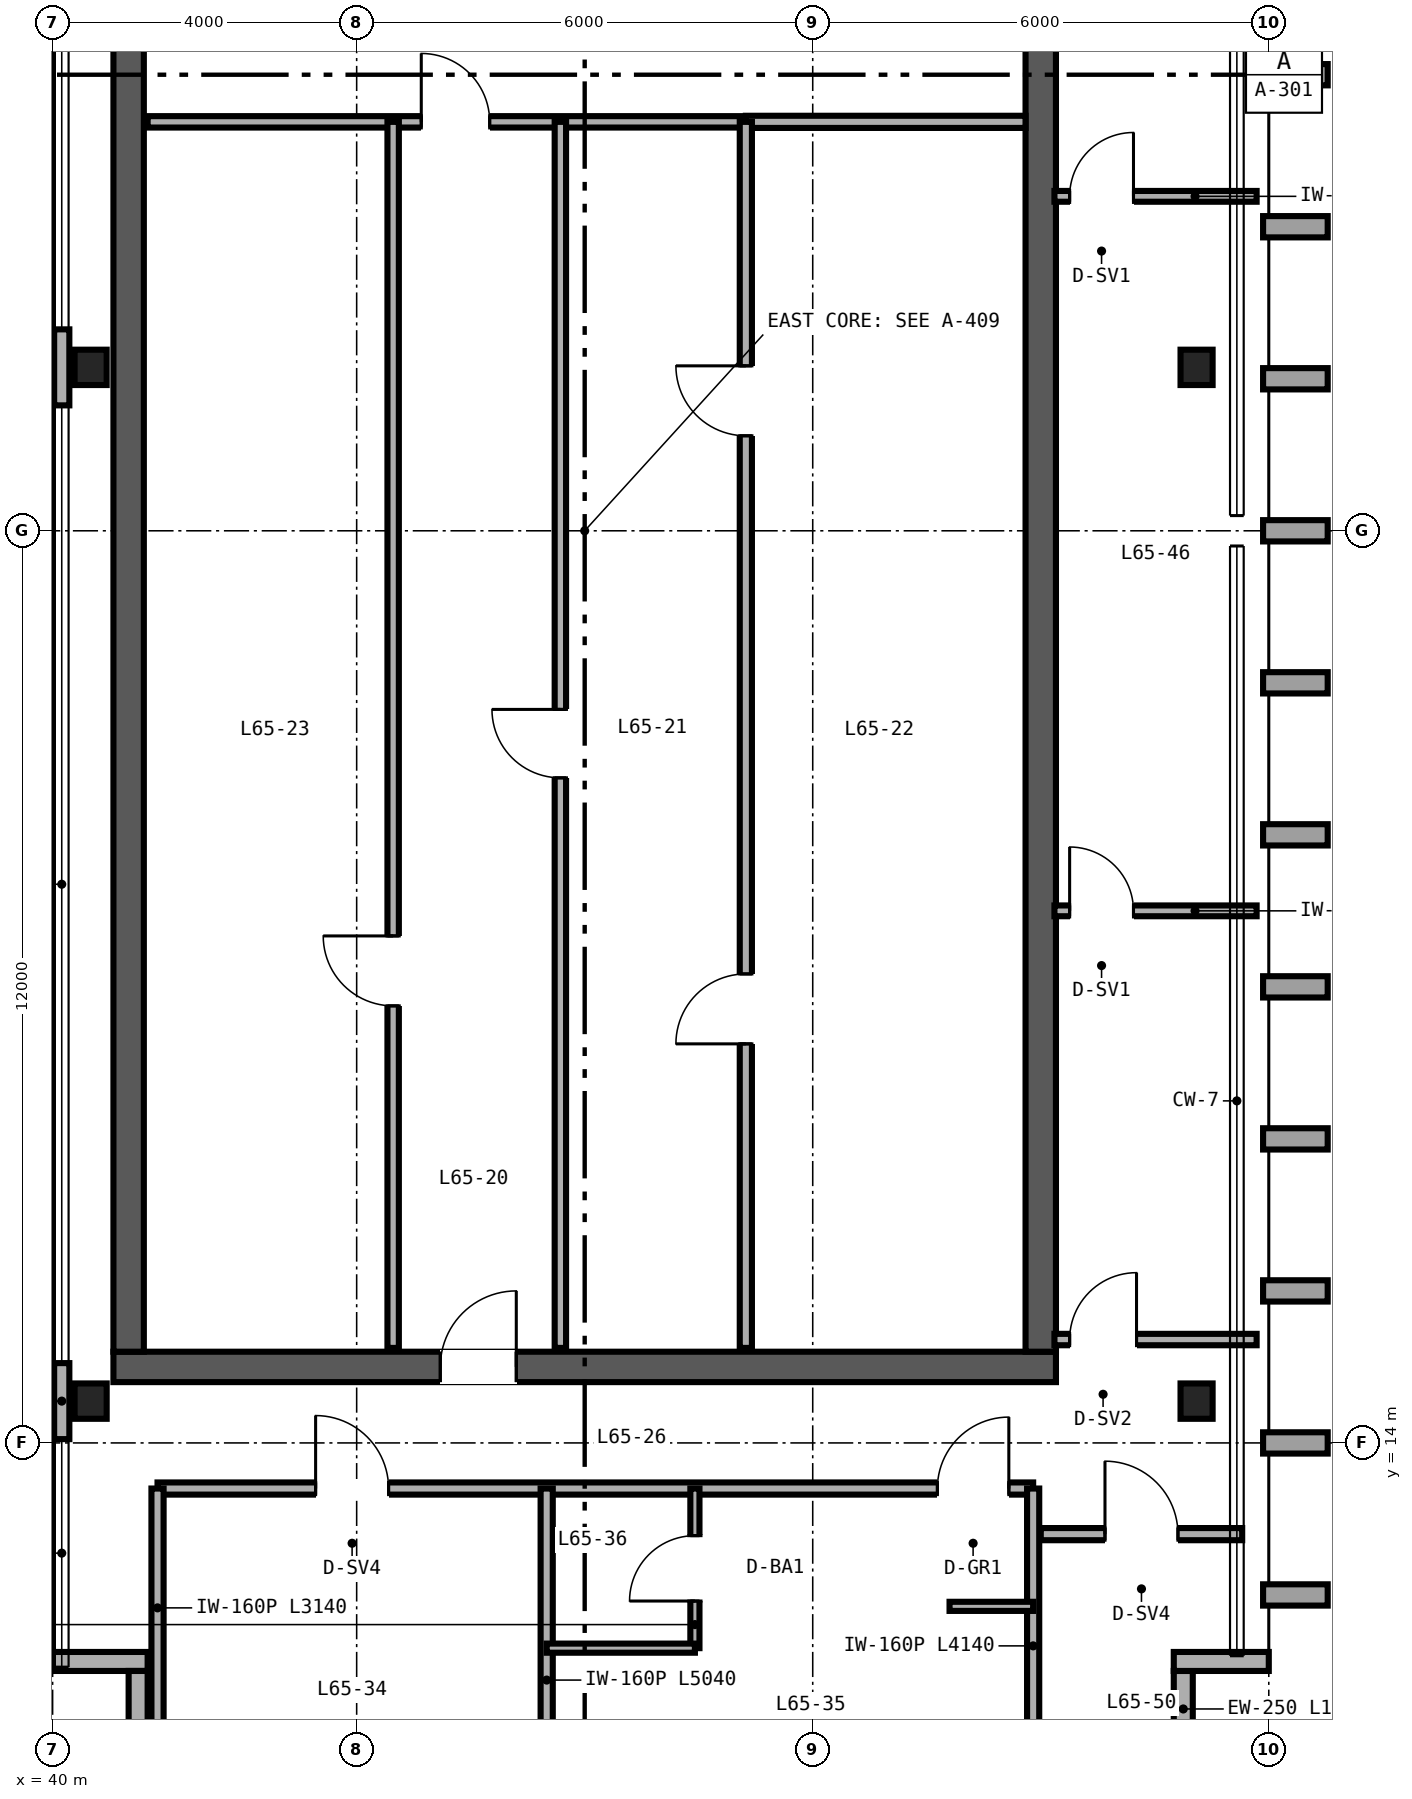
"""IFC4 building model, lengths in metres.
Left out: names, types, materials, properties, quantities, classifications, styles, units other than length and angle.
Written with IfcOpenShell. Run it as: python <this file> out.ifc"""

import sys

from ifc_helpers import new_model, si_unit, direction, frame, frame_2d, origin, origin_2d, place, context, subcontext, project, spatial, rectangle, i_section, extrude, source, transform, mapped, element, fill, save


model = new_model("IFC4")
c1 = context("Model", 3, precision=1e-05, world=origin(), true_north=direction((0.0, 1.0)))
c2 = subcontext(c1, "Body", "Model", "MODEL_VIEW")
j1 = project(units=[si_unit("LENGTHUNIT", "METRE"), si_unit("PLANEANGLEUNIT", "RADIAN")], contexts=[c1])
p1 = place(None, origin())
s1 = spatial("IfcSite", under=j1, at=p1, CompositionType="ELEMENT")
p2 = place(p1, origin())
s2 = spatial("IfcBuilding", under=s1, at=p2, CompositionType="ELEMENT")
p3 = place(p2, frame((0.0, 0.0, 258.0)))
s3 = spatial("IfcBuildingStorey", under=s2, at=p3, CompositionType="ELEMENT", Elevation=258.0)
p4 = place(p3, frame((40.8, 15.0, 0.0), z_axis=(0.0, 0.0, 1.0), x_axis=(1.0, 0.0, 0.0)))
e1 = element("IfcWall", 1, at=p4, inside=s3, PredefinedType="SHEAR", context=c2, shape_type="SweptSolid", body=[
    extrude(rectangle(XDim=12.4, YDim=0.4, at=frame_2d((6.2, 0.0))), origin(), (0.0, 0.0, 1.0), 3.38),
])
p5 = place(p4, frame((4.3, 0.0, 0.0)))
e2 = element("IfcOpeningElement", 2, at=p5, cuts=e1, PredefinedType="OPENING", context=c2, shape_type="SweptSolid", body=[
    extrude(rectangle(XDim=1.0, YDim=2.15, at=frame_2d((0.5, 1.075))), frame((0.0, 0.21, 0.0), z_axis=(0.0, -1.0, 0.0), x_axis=(1.0, 0.0, 0.0)), (0.0, 0.0, 1.0), 0.42),
])
for number, where, z_axis, x_axis in (
    (3, (41.0, 15.2, 0.0), (0.0, 0.0, 1.0), (0.0, 1.0, 0.0)),
    (4, (53.0, 15.2, 0.0), (0.0, 0.0, 1.0), (0.0, 1.0, 0.0)),
):
    element("IfcWall", number, at=place(p3, frame(where, z_axis=z_axis, x_axis=x_axis)), inside=s3, PredefinedType="SHEAR", context=c2, shape_type="SweptSolid", body=[
        extrude(rectangle(XDim=21.6, YDim=0.4, at=frame_2d((10.8, 0.0))), origin(), (0.0, 0.0, 1.0), 3.38),
    ])
m1 = source(origin(), c2, "Body", "SweptSolid", [
    extrude(i_section(OverallWidth=0.422, OverallDepth=0.465, WebThickness=0.045, FlangeThickness=0.073, FilletRadius=0.025, at=origin_2d()), origin(), (0.0, 0.0, 1.0), 3.38),
])
for number, where, z_axis, x_axis in (
    (5, (40.5, 14.55, 0.0), (0.0, 0.0, 1.0), (1.0, 0.0, 0.0)),
    (6, (55.05, 14.55, 0.0), (0.0, 0.0, 1.0), (1.0, 0.0, 0.0)),
    (7, (40.5, 28.15, 0.0), (0.0, 0.0, 1.0), (1.0, 0.0, 0.0)),
    (8, (55.05, 28.15, 0.0), (0.0, 0.0, 1.0), (1.0, 0.0, 0.0)),
):
    element("IfcColumn", number, at=place(p3, frame(where, z_axis=z_axis, x_axis=x_axis)), inside=s3, PredefinedType="COLUMN", context=c2, shape_type="MappedRepresentation", body=[
        mapped(m1, transform((0.0, 0.0, 0.0), scale=1.0)),
    ])
p6 = place(p3, frame((54.875, 10.0, 0.0), z_axis=(0.0, 0.0, 1.0), x_axis=(0.0, 1.0, 0.0)))
e9 = element("IfcWall", 9, at=p6, inside=s3, PredefinedType="SOLIDWALL", context=c2, shape_type="SweptSolid", body=[
    extrude(rectangle(XDim=1.0, YDim=0.25, at=frame_2d((0.5, 0.0))), origin(), (0.0, 0.0, 1.0), 3.38),
])
for number, where, z_axis, x_axis in (
    (10, (54.75, 11.125, 0.0), (0.0, 0.0, 1.0), (1.0, 0.0, 0.0)),
    (11, (40.0, 11.125, 0.0), (0.0, 0.0, 1.0), (1.0, 0.0, 0.0)),
):
    element("IfcWall", number, at=place(p3, frame(where, z_axis=z_axis, x_axis=x_axis)), inside=s3, PredefinedType="SOLIDWALL", context=c2, shape_type="SweptSolid", body=[
        extrude(rectangle(XDim=1.25, YDim=0.25, at=frame_2d((0.625, 0.0))), origin(), (0.0, 0.0, 1.0), 3.38),
    ])
p7 = place(p3, frame((41.125, 11.0, 0.0), z_axis=(0.0, 0.0, 1.0), x_axis=(0.0, -1.0, 0.0)))
e12 = element("IfcWall", 12, at=p7, inside=s3, PredefinedType="SOLIDWALL", context=c2, shape_type="SweptSolid", body=[
    extrude(rectangle(XDim=1.0, YDim=0.25, at=frame_2d((0.5, 0.0))), origin(), (0.0, 0.0, 1.0), 3.38),
])
for number, where, z_axis, x_axis in (
    (13, (40.12, 14.05, 0.0), (0.0, 0.0, 1.0), (0.0, 1.0, 0.0)),
    (14, (40.12, 27.65, 0.0), (0.0, 0.0, 1.0), (0.0, 1.0, 0.0)),
):
    element("IfcWall", number, at=place(p3, frame(where, z_axis=z_axis, x_axis=x_axis)), inside=s3, PredefinedType="PARAPET", context=c2, shape_type="SweptSolid", body=[
        extrude(rectangle(XDim=1.0, YDim=0.2, at=frame_2d((0.5, 0.0))), origin(), (0.0, 0.0, 1.0), 3.38),
    ])
p8 = place(p3, frame((41.25, 31.38, 0.0), z_axis=(0.0, 0.0, 1.0), x_axis=(1.0, 0.0, 0.0)))
e15 = element("IfcWall", 15, at=p8, inside=s3, PredefinedType="PARTITIONING", context=c2, shape_type="SweptSolid", body=[
    extrude(rectangle(XDim=7.87, YDim=0.15, at=frame_2d((3.935, 0.0))), origin(), (0.0, 0.0, 1.0), 2.48),
])
p9 = place(p8, frame((3.6, 0.0, 0.0)))
e16 = element("IfcOpeningElement", 16, at=p9, cuts=e15, PredefinedType="OPENING", context=c2, shape_type="SweptSolid", body=[
    extrude(rectangle(XDim=0.9, YDim=2.15, at=frame_2d((0.45, 1.075))), frame((0.0, 0.085, 0.0), z_axis=(0.0, -1.0, 0.0), x_axis=(1.0, 0.0, 0.0)), (0.0, 0.0, 1.0), 0.17),
])
p10 = place(p3, frame((46.68, 15.25, 0.0), z_axis=(0.0, 0.0, 1.0), x_axis=(0.0, 1.0, 0.0)))
e17 = element("IfcWall", 17, at=p10, inside=s3, PredefinedType="PARTITIONING", context=c2, shape_type="SweptSolid", body=[
    extrude(rectangle(XDim=16.13, YDim=0.15, at=frame_2d((8.065, 0.0))), origin(), (0.0, 0.0, 1.0), 2.453),
])
p11 = place(p10, frame((7.5, 0.0, 0.0)))
e18 = element("IfcOpeningElement", 18, at=p11, cuts=e17, PredefinedType="OPENING", context=c2, shape_type="SweptSolid", body=[
    extrude(rectangle(XDim=0.9, YDim=2.15, at=frame_2d((0.45, 1.075))), frame((0.0, 0.085, 0.0), z_axis=(0.0, -1.0, 0.0), x_axis=(1.0, 0.0, 0.0)), (0.0, 0.0, 1.0), 0.17),
])
p12 = place(p3, frame((49.12, 31.38, 0.0), z_axis=(0.0, 0.0, 1.0), x_axis=(1.0, 0.0, 0.0)))
e19 = element("IfcWall", 19, at=p12, inside=s3, PredefinedType="PARTITIONING", context=c2, shape_type="SweptSolid", body=[
    extrude(rectangle(XDim=3.68, YDim=0.16, at=frame_2d((1.84, 0.0))), origin(), (0.0, 0.0, 1.0), 2.48),
])
p13 = place(p3, frame((49.12, 15.25, 0.0), z_axis=(0.0, 0.0, 1.0), x_axis=(0.0, 1.0, 0.0)))
e20 = element("IfcWall", 20, at=p13, inside=s3, PredefinedType="PARTITIONING", context=c2, shape_type="SweptSolid", body=[
    extrude(rectangle(XDim=16.13, YDim=0.16, at=frame_2d((8.065, 0.0))), origin(), (0.0, 0.0, 1.0), 2.453),
])
p14 = place(p13, frame((4.0, 0.0, 0.0)))
e21 = element("IfcOpeningElement", 21, at=p14, cuts=e20, PredefinedType="OPENING", context=c2, shape_type="SweptSolid", body=[
    extrude(rectangle(XDim=0.92, YDim=2.15, at=frame_2d((0.46, 1.075))), frame((0.0, 0.09, 0.0), z_axis=(0.0, -1.0, 0.0), x_axis=(1.0, 0.0, 0.0)), (0.0, 0.0, 1.0), 0.18),
])
p15 = place(p13, frame((12.0, 0.0, 0.0)))
e22 = element("IfcOpeningElement", 22, at=p15, cuts=e20, PredefinedType="OPENING", context=c2, shape_type="SweptSolid", body=[
    extrude(rectangle(XDim=0.92, YDim=2.15, at=frame_2d((0.46, 1.075))), frame((0.0, 0.09, 0.0), z_axis=(0.0, -1.0, 0.0), x_axis=(1.0, 0.0, 0.0)), (0.0, 0.0, 1.0), 0.18),
])
p16 = place(p3, frame((44.48, 15.25, 0.0), z_axis=(0.0, 0.0, 1.0), x_axis=(0.0, 1.0, 0.0)))
e23 = element("IfcWall", 23, at=p16, inside=s3, PredefinedType="PARTITIONING", context=c2, shape_type="SweptSolid", body=[
    extrude(rectangle(XDim=16.13, YDim=0.15, at=frame_2d((8.065, 0.0))), origin(), (0.0, 0.0, 1.0), 2.453),
])
p17 = place(p16, frame((4.5, 0.0, 0.0)))
e24 = element("IfcOpeningElement", 24, at=p17, cuts=e23, PredefinedType="OPENING", context=c2, shape_type="SweptSolid", body=[
    extrude(rectangle(XDim=0.92, YDim=2.15, at=frame_2d((0.46, 1.075))), frame((0.0, 0.085, 0.0), z_axis=(0.0, -1.0, 0.0), x_axis=(1.0, 0.0, 0.0)), (0.0, 0.0, 1.0), 0.17),
])
p18 = place(p3, frame((41.38, 13.4, 0.0), z_axis=(0.0, 0.0, 1.0), x_axis=(1.0, 0.0, 0.0)))
e25 = element("IfcWall", 25, at=p18, inside=s3, PredefinedType="PARTITIONING", context=c2, shape_type="SweptSolid", body=[
    extrude(rectangle(XDim=11.52, YDim=0.16, at=frame_2d((5.76, 0.0))), origin(), (0.0, 0.0, 1.0), 3.38),
])
p19 = place(p18, frame((2.08, 0.0, 0.0)))
e26 = element("IfcOpeningElement", 26, at=p19, cuts=e25, PredefinedType="OPENING", context=c2, shape_type="SweptSolid", body=[
    extrude(rectangle(XDim=0.96, YDim=2.15, at=frame_2d((0.48, 1.075))), frame((0.0, 0.09, 0.0), z_axis=(0.0, -1.0, 0.0), x_axis=(1.0, 0.0, 0.0)), (0.0, 0.0, 1.0), 0.18),
])
p20 = place(p18, frame((10.26, 0.0, 0.0)))
e27 = element("IfcOpeningElement", 27, at=p20, cuts=e25, PredefinedType="OPENING", context=c2, shape_type="SweptSolid", body=[
    extrude(rectangle(XDim=0.94, YDim=2.15, at=frame_2d((0.47, 1.075))), frame((0.0, 0.09, 0.0), z_axis=(0.0, -1.0, 0.0), x_axis=(1.0, 0.0, 0.0)), (0.0, 0.0, 1.0), 0.18),
])
p21 = place(p3, frame((41.38, 10.26, 0.0), z_axis=(0.0, 0.0, 1.0), x_axis=(0.0, 1.0, 0.0)))
e28 = element("IfcWall", 28, at=p21, inside=s3, PredefinedType="PARTITIONING", context=c2, shape_type="SweptSolid", body=[
    extrude(rectangle(XDim=3.14, YDim=0.16, at=frame_2d((1.57, 0.0))), origin(), (0.0, 0.0, 1.0), 3.38),
])
p22 = place(p3, frame((52.9, 9.26, 0.0), z_axis=(0.0, 0.0, 1.0), x_axis=(0.0, 1.0, 0.0)))
e29 = element("IfcWall", 29, at=p22, inside=s3, PredefinedType="PARTITIONING", context=c2, shape_type="SweptSolid", body=[
    extrude(rectangle(XDim=4.14, YDim=0.16, at=frame_2d((2.07, 0.0))), origin(), (0.0, 0.0, 1.0), 3.38),
])
p23 = place(p3, frame((46.5, 8.36, 0.0), z_axis=(0.0, 0.0, 1.0), x_axis=(0.0, 1.0, 0.0)))
e30 = element("IfcWall", 30, at=p23, inside=s3, PredefinedType="PARTITIONING", context=c2, shape_type="SweptSolid", body=[
    extrude(rectangle(XDim=5.04, YDim=0.16, at=frame_2d((2.52, 0.0))), origin(), (0.0, 0.0, 1.0), 2.687),
])
p24 = place(p3, frame((48.45, 11.3, 0.0), z_axis=(0.0, 0.0, 1.0), x_axis=(0.0, 1.0, 0.0)))
e31 = element("IfcWall", 31, at=p24, inside=s3, PredefinedType="PARTITIONING", context=c2, shape_type="SweptSolid", body=[
    extrude(rectangle(XDim=2.1, YDim=0.12, at=frame_2d((1.05, 0.0))), origin(), (0.0, 0.0, 1.0), 3.38),
])
p25 = place(p24, frame((0.62, 0.0, 0.0)))
e32 = element("IfcOpeningElement", 32, at=p25, cuts=e31, PredefinedType="OPENING", context=c2, shape_type="SweptSolid", body=[
    extrude(rectangle(XDim=0.86, YDim=2.1, at=frame_2d((0.43, 1.05))), frame((0.0, 0.07, 0.0), z_axis=(0.0, -1.0, 0.0), x_axis=(1.0, 0.0, 0.0)), (0.0, 0.0, 1.0), 0.14),
])
p26 = place(p3, frame((46.5, 11.3, 0.0), z_axis=(0.0, 0.0, 1.0), x_axis=(1.0, 0.0, 0.0)))
e33 = element("IfcWall", 33, at=p26, inside=s3, PredefinedType="PARTITIONING", context=c2, shape_type="SweptSolid", body=[
    extrude(rectangle(XDim=1.95, YDim=0.12, at=frame_2d((0.975, 0.0))), origin(), (0.0, 0.0, 1.0), 3.38),
])
p27 = place(p3, frame((51.8, 11.85, 0.0), z_axis=(0.0, 0.0, 1.0), x_axis=(1.0, 0.0, 0.0)))
e34 = element("IfcWall", 34, at=p27, inside=s3, PredefinedType="PARTITIONING", context=c2, shape_type="SweptSolid", body=[
    extrude(rectangle(XDim=1.1, YDim=0.12, at=frame_2d((0.55, 0.0))), origin(), (0.0, 0.0, 1.0), 3.38),
])
p28 = place(p3, frame((53.18, 15.36, 0.0), z_axis=(0.0, 0.0, 1.0), x_axis=(1.0, 0.0, 0.0)))
e35 = element("IfcWall", 35, at=p28, inside=s3, PredefinedType="PARTITIONING", context=c2, shape_type="SweptSolid", body=[
    extrude(rectangle(XDim=2.66, YDim=0.15, at=frame_2d((1.33, 0.0))), origin(), (0.0, 0.0, 1.0), 2.601),
])
p29 = place(p28, frame((0.2, 0.0, 0.0)))
e36 = element("IfcOpeningElement", 36, at=p29, cuts=e35, PredefinedType="OPENING", context=c2, shape_type="SweptSolid", body=[
    extrude(rectangle(XDim=0.88, YDim=2.15, at=frame_2d((0.44, 1.075))), frame((0.0, 0.085, 0.0), z_axis=(0.0, -1.0, 0.0), x_axis=(1.0, 0.0, 0.0)), (0.0, 0.0, 1.0), 0.17),
])
p30 = place(p3, frame((53.18, 21.0, 0.0), z_axis=(0.0, 0.0, 1.0), x_axis=(1.0, 0.0, 0.0)))
e37 = element("IfcWall", 37, at=p30, inside=s3, PredefinedType="PARTITIONING", context=c2, shape_type="SweptSolid", body=[
    extrude(rectangle(XDim=2.66, YDim=0.142, at=frame_2d((1.33, 0.0))), origin(), (0.0, 0.0, 1.0), 2.601),
])
p31 = place(p30, frame((0.2, 0.0, 0.0)))
e38 = element("IfcOpeningElement", 38, at=p31, cuts=e37, PredefinedType="OPENING", context=c2, shape_type="SweptSolid", body=[
    extrude(rectangle(XDim=0.84, YDim=2.1, at=frame_2d((0.42, 1.05))), frame((0.0, 0.081, 0.0), z_axis=(0.0, -1.0, 0.0), x_axis=(1.0, 0.0, 0.0)), (0.0, 0.0, 1.0), 0.162),
])
p32 = place(p3, frame((53.18, 30.4, 0.0), z_axis=(0.0, 0.0, 1.0), x_axis=(1.0, 0.0, 0.0)))
e39 = element("IfcWall", 39, at=p32, inside=s3, PredefinedType="PARTITIONING", context=c2, shape_type="SweptSolid", body=[
    extrude(rectangle(XDim=2.66, YDim=0.142, at=frame_2d((1.33, 0.0))), origin(), (0.0, 0.0, 1.0), 2.763),
])
p33 = place(p32, frame((0.2, 0.0, 0.0)))
e40 = element("IfcOpeningElement", 40, at=p33, cuts=e39, PredefinedType="OPENING", context=c2, shape_type="SweptSolid", body=[
    extrude(rectangle(XDim=0.84, YDim=2.1, at=frame_2d((0.42, 1.05))), frame((0.0, 0.081, 0.0), z_axis=(0.0, -1.0, 0.0), x_axis=(1.0, 0.0, 0.0)), (0.0, 0.0, 1.0), 0.162),
])
p34 = place(p3, frame((53.0, 12.8, 0.0), z_axis=(0.0, 0.0, 1.0), x_axis=(1.0, 0.0, 0.0)))
e41 = element("IfcWall", 41, at=p34, inside=s3, PredefinedType="PARTITIONING", context=c2, shape_type="SweptSolid", body=[
    extrude(rectangle(XDim=2.65, YDim=0.16, at=frame_2d((1.325, 0.0))), origin(), (0.0, 0.0, 1.0), 3.38),
])
p35 = place(p34, frame((0.845, 0.0, 0.0)))
e42 = element("IfcOpeningElement", 42, at=p35, cuts=e41, PredefinedType="OPENING", context=c2, shape_type="SweptSolid", body=[
    extrude(rectangle(XDim=0.96, YDim=2.15, at=frame_2d((0.48, 1.075))), frame((0.0, 0.09, 0.0), z_axis=(0.0, -1.0, 0.0), x_axis=(1.0, 0.0, 0.0)), (0.0, 0.0, 1.0), 0.18),
])
m2 = source(origin(), c2, "Body", "SweptSolid", [
    extrude(rectangle(XDim=0.9, YDim=2.15, at=frame_2d((0.45, 1.075))), frame((0.0, 0.025, 0.0), z_axis=(0.0, -1.0, 0.0), x_axis=(1.0, 0.0, 0.0)), (0.0, 0.0, 1.0), 0.05),
])
p36 = place(p11, origin())
e43 = element("IfcDoor", 43, at=p36, inside=s3, OperationType="SINGLE_SWING_RIGHT", PredefinedType="DOOR", context=c2, shape_type="MappedRepresentation", body=[
    mapped(m2, transform((0.0, 0.0, 0.0), scale=1.0)),
])
fill(e18, e43)
p37 = place(p9, origin())
e44 = element("IfcDoor", 44, at=p37, inside=s3, OperationType="SINGLE_SWING_LEFT", PredefinedType="DOOR", context=c2, shape_type="MappedRepresentation", body=[
    mapped(m2, transform((0.0, 0.0, 0.0), scale=1.0)),
])
fill(e16, e44)
m3 = source(origin(), c2, "Body", "SweptSolid", [
    extrude(rectangle(XDim=1.0, YDim=2.15, at=frame_2d((0.5, 1.075))), frame((0.0, 0.025, 0.0), z_axis=(0.0, -1.0, 0.0), x_axis=(1.0, 0.0, 0.0)), (0.0, 0.0, 1.0), 0.05),
])
p38 = place(p5, origin())
e45 = element("IfcDoor", 45, at=p38, inside=s3, OperationType="SINGLE_SWING_RIGHT", PredefinedType="DOOR", context=c2, shape_type="MappedRepresentation", body=[
    mapped(m3, transform((0.0, 0.0, 0.0), scale=1.0)),
])
fill(e2, e45)
m4 = source(origin(), c2, "Body", "SweptSolid", [
    extrude(rectangle(XDim=0.92, YDim=2.15, at=frame_2d((0.46, 1.075))), frame((0.0, 0.025, 0.0), z_axis=(0.0, -1.0, 0.0), x_axis=(1.0, 0.0, 0.0)), (0.0, 0.0, 1.0), 0.05),
])
p39 = place(p14, origin())
e46 = element("IfcDoor", 46, at=p39, inside=s3, OperationType="SINGLE_SWING_LEFT", PredefinedType="DOOR", context=c2, shape_type="MappedRepresentation", body=[
    mapped(m4, transform((0.0, 0.0, 0.0), scale=1.0)),
])
fill(e21, e46)
p40 = place(p15, origin())
e47 = element("IfcDoor", 47, at=p40, inside=s3, OperationType="SINGLE_SWING_RIGHT", PredefinedType="DOOR", context=c2, shape_type="MappedRepresentation", body=[
    mapped(m4, transform((0.0, 0.0, 0.0), scale=1.0)),
])
fill(e22, e47)
p41 = place(p17, origin())
e48 = element("IfcDoor", 48, at=p41, inside=s3, OperationType="SINGLE_SWING_RIGHT", PredefinedType="DOOR", context=c2, shape_type="MappedRepresentation", body=[
    mapped(m4, transform((0.0, 0.0, 0.0), scale=1.0)),
])
fill(e24, e48)
m5 = source(origin(), c2, "Body", "SweptSolid", [
    extrude(rectangle(XDim=0.86, YDim=2.1, at=frame_2d((0.43, 1.05))), frame((0.0, 0.025, 0.0), z_axis=(0.0, -1.0, 0.0), x_axis=(1.0, 0.0, 0.0)), (0.0, 0.0, 1.0), 0.05),
])
p42 = place(p25, origin())
e49 = element("IfcDoor", 49, at=p42, inside=s3, OperationType="SINGLE_SWING_LEFT", PredefinedType="DOOR", context=c2, shape_type="MappedRepresentation", body=[
    mapped(m5, transform((0.0, 0.0, 0.0), scale=1.0)),
])
fill(e32, e49)
m6 = source(origin(), c2, "Body", "SweptSolid", [
    extrude(rectangle(XDim=0.96, YDim=2.15, at=frame_2d((0.48, 1.075))), frame((0.0, 0.025, 0.0), z_axis=(0.0, -1.0, 0.0), x_axis=(1.0, 0.0, 0.0)), (0.0, 0.0, 1.0), 0.05),
])
p43 = place(p19, origin())
e50 = element("IfcDoor", 50, at=p43, inside=s3, OperationType="SINGLE_SWING_LEFT", PredefinedType="DOOR", context=c2, shape_type="MappedRepresentation", body=[
    mapped(m6, transform((0.0, 0.0, 0.0), scale=1.0)),
])
fill(e26, e50)
m7 = source(origin(), c2, "Body", "SweptSolid", [
    extrude(rectangle(XDim=0.94, YDim=2.15, at=frame_2d((0.47, 1.075))), frame((0.0, 0.025, 0.0), z_axis=(0.0, -1.0, 0.0), x_axis=(1.0, 0.0, 0.0)), (0.0, 0.0, 1.0), 0.05),
])
p44 = place(p20, origin())
e51 = element("IfcDoor", 51, at=p44, inside=s3, OperationType="SINGLE_SWING_RIGHT", PredefinedType="DOOR", context=c2, shape_type="MappedRepresentation", body=[
    mapped(m7, transform((0.0, 0.0, 0.0), scale=1.0)),
])
fill(e27, e51)
m8 = source(origin(), c2, "Body", "SweptSolid", [
    extrude(rectangle(XDim=0.88, YDim=2.15, at=frame_2d((0.44, 1.075))), frame((0.0, 0.025, 0.0), z_axis=(0.0, -1.0, 0.0), x_axis=(1.0, 0.0, 0.0)), (0.0, 0.0, 1.0), 0.05),
])
p45 = place(p29, origin())
e52 = element("IfcDoor", 52, at=p45, inside=s3, OperationType="SINGLE_SWING_RIGHT", PredefinedType="DOOR", context=c2, shape_type="MappedRepresentation", body=[
    mapped(m8, transform((0.0, 0.0, 0.0), scale=1.0)),
])
fill(e36, e52)
m9 = source(origin(), c2, "Body", "SweptSolid", [
    extrude(rectangle(XDim=0.84, YDim=2.1, at=frame_2d((0.42, 1.05))), frame((0.0, 0.025, 0.0), z_axis=(0.0, -1.0, 0.0), x_axis=(1.0, 0.0, 0.0)), (0.0, 0.0, 1.0), 0.05),
])
p46 = place(p31, origin())
e53 = element("IfcDoor", 53, at=p46, inside=s3, OperationType="SINGLE_SWING_LEFT", PredefinedType="DOOR", context=c2, shape_type="MappedRepresentation", body=[
    mapped(m9, transform((0.0, 0.0, 0.0), scale=1.0)),
])
fill(e38, e53)
p47 = place(p33, origin())
e54 = element("IfcDoor", 54, at=p47, inside=s3, OperationType="SINGLE_SWING_RIGHT", PredefinedType="DOOR", context=c2, shape_type="MappedRepresentation", body=[
    mapped(m9, transform((0.0, 0.0, 0.0), scale=1.0)),
])
fill(e40, e54)
p48 = place(p35, origin())
e55 = element("IfcDoor", 55, at=p48, inside=s3, OperationType="SINGLE_SWING_LEFT", PredefinedType="DOOR", context=c2, shape_type="MappedRepresentation", body=[
    mapped(m6, transform((0.0, 0.0, 0.0), scale=1.0)),
])
fill(e42, e55)
save(model, sys.argv[1])
